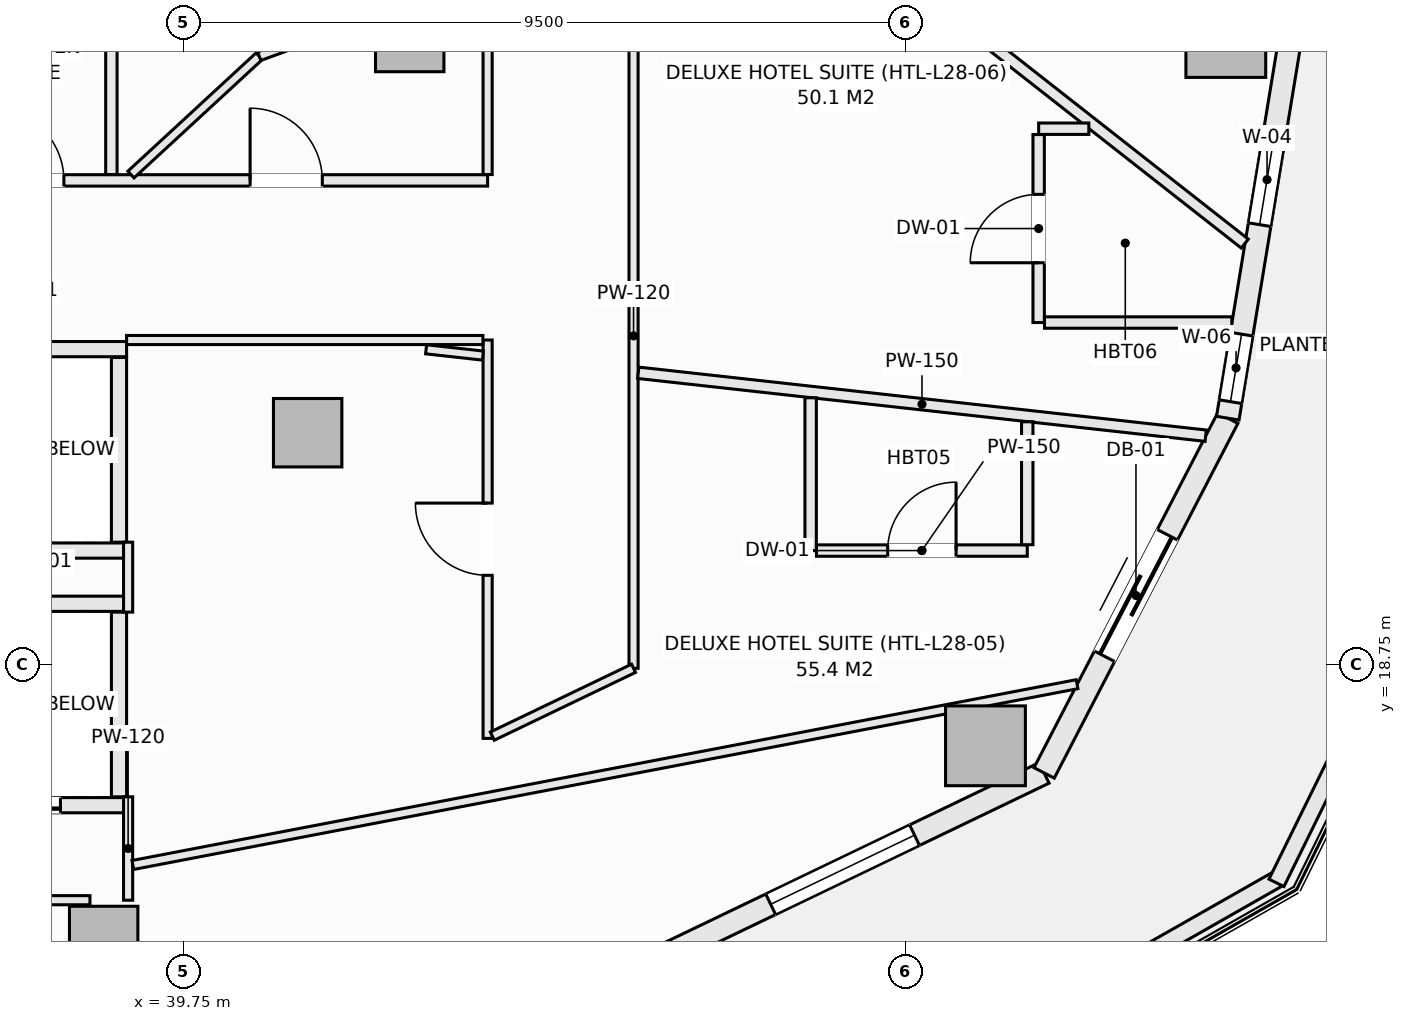
"""IFC4 building model, lengths in metres.
Left out: names, types, materials, properties, quantities, classifications, styles, units other than length and angle.
Written with IfcOpenShell. Run it as: python <this file> out.ifc"""

import sys

from ifc_helpers import new_model, si_unit, direction, frame, frame_2d, origin, origin_2d, place, context, subcontext, project, spatial, rectangle, extrude, element, fill, save


model = new_model("IFC4")
c1 = context("Model", 3, precision=1e-05, world=origin(), true_north=direction((0.0, 1.0)))
c2 = subcontext(c1, "Body", "Model", "MODEL_VIEW")
j1 = project(units=[si_unit("LENGTHUNIT", "METRE"), si_unit("PLANEANGLEUNIT", "RADIAN")], contexts=[c1])
p1 = place(None, origin())
s1 = spatial("IfcSite", under=j1, at=p1, CompositionType="ELEMENT")
p2 = place(p1, origin())
s2 = spatial("IfcBuilding", under=s1, at=p2, CompositionType="ELEMENT")
p3 = place(p2, frame((0.0, 0.0, 115.5)))
s3 = spatial("IfcBuildingStorey", under=s2, at=p3, CompositionType="ELEMENT", Elevation=115.5)
for number, where, z_axis, x_axis in (
    (1, (53.462, 27.0, -0.27), (0.0, 0.0, 1.0), (1.0, 0.0, 0.0)),
    (2, (50.3, 17.681, -0.27), (0.0, 0.0, 1.0), (1.0, 0.0, 0.0)),
):
    element("IfcColumn", number, at=place(p3, frame(where, z_axis=z_axis, x_axis=x_axis)), inside=s3, PredefinedType="COLUMN", context=c2, shape_type="SweptSolid", body=[
        extrude(rectangle(XDim=1.05, YDim=1.05, at=origin_2d()), origin(), (0.0, 0.0, 1.0), 3.4),
    ])
for number, where, z_axis, x_axis in (
    (3, (42.725, 27.0, -0.27), (0.0, 0.0, 1.0), (1.0, 0.0, 0.0)),
    (4, (38.698, 15.121, -0.27), (0.0, 0.0, 1.0), (1.0, 0.0, 0.0)),
    (5, (41.382, 21.801, -0.27), (0.0, 0.0, 1.0), (1.0, 0.0, 0.0)),
):
    element("IfcColumn", number, at=place(p3, frame(where, z_axis=z_axis, x_axis=x_axis)), inside=s3, PredefinedType="COLUMN", context=c2, shape_type="SweptSolid", body=[
        extrude(rectangle(XDim=0.9, YDim=0.9, at=origin_2d()), origin(), (0.0, 0.0, 1.0), 3.4),
    ])
p4 = place(p3, frame((45.769, 14.777, 0.0), z_axis=(0.0, 0.0, 1.0), x_axis=(0.901370184739, 0.433049408339, 0.0)))
e6 = element("IfcWall", 6, at=p4, inside=s3, PredefinedType="SOLIDWALL", context=c2, shape_type="SweptSolid", body=[
    extrude(rectangle(XDim=5.884, YDim=0.3, at=frame_2d((2.942, 0.0))), origin(), (0.0, 0.0, 1.0), 2.653),
])
p5 = place(p4, frame((1.892, 0.0, 0.74)))
e7 = element("IfcOpeningElement", 7, at=p5, cuts=e6, PredefinedType="OPENING", context=c2, shape_type="SweptSolid", body=[
    extrude(rectangle(XDim=2.1, YDim=1.7, at=frame_2d((1.05, 0.85))), frame((0.0, 0.16, 0.0), z_axis=(0.0, -1.0, 0.0), x_axis=(1.0, 0.0, 0.0)), (0.0, 0.0, 1.0), 0.32),
])
p6 = place(p3, frame((51.072, 17.325, 0.0), z_axis=(0.0, 0.0, 1.0), x_axis=(0.459767899643, 0.888039119892, 0.0)))
e8 = element("IfcWall", 8, at=p6, inside=s3, PredefinedType="SOLIDWALL", context=c2, shape_type="SweptSolid", body=[
    extrude(rectangle(XDim=5.255, YDim=0.3, at=frame_2d((2.628, 0.0))), origin(), (0.0, 0.0, 1.0), 2.653),
])
p7 = place(p6, frame((1.728, 0.0, 0.0)))
e9 = element("IfcOpeningElement", 9, at=p7, cuts=e8, PredefinedType="OPENING", context=c2, shape_type="SweptSolid", body=[
    extrude(rectangle(XDim=1.8, YDim=2.25, at=frame_2d((0.9, 1.125))), frame((0.0, 0.16, 0.0), z_axis=(0.0, -1.0, 0.0), x_axis=(1.0, 0.0, 0.0)), (0.0, 0.0, 1.0), 0.32),
])
p8 = place(p3, frame((53.488, 21.992, 0.0), z_axis=(0.0, 0.0, 1.0), x_axis=(0.162393944769, 0.986726003864, 0.0)))
e10 = element("IfcWall", 10, at=p8, inside=s3, PredefinedType="SOLIDWALL", context=c2, shape_type="SweptSolid", body=[
    extrude(rectangle(XDim=5.075, YDim=0.3, at=frame_2d((2.538, 0.0))), origin(), (0.0, 0.0, 1.0), 2.653),
])
p9 = place(p8, frame((2.58, 0.0, 0.72)))
e11 = element("IfcOpeningElement", 11, at=p9, cuts=e10, PredefinedType="OPENING", context=c2, shape_type="SweptSolid", body=[
    extrude(rectangle(XDim=1.2, YDim=1.65, at=frame_2d((0.6, 0.825))), frame((0.0, 0.16, 0.0), z_axis=(0.0, -1.0, 0.0), x_axis=(1.0, 0.0, 0.0)), (0.0, 0.0, 1.0), 0.32),
])
p10 = place(p8, frame((0.22, 0.0, 0.72)))
e12 = element("IfcOpeningElement", 12, at=p10, cuts=e10, PredefinedType="OPENING", context=c2, shape_type="SweptSolid", body=[
    extrude(rectangle(XDim=0.9, YDim=1.65, at=frame_2d((0.45, 0.825))), frame((0.0, 0.16, 0.0), z_axis=(0.0, -1.0, 0.0), x_axis=(1.0, 0.0, 0.0)), (0.0, 0.0, 1.0), 0.32),
])
p11 = place(p3, frame((48.413, 12.668, 0.0), z_axis=(0.0, 0.0, 1.0), x_axis=(0.869187658335, 0.494482370361, 0.0)))
e13 = element("IfcWall", 13, at=p11, inside=s3, PredefinedType="PARAPET", context=c2, shape_type="SweptSolid", body=[
    extrude(rectangle(XDim=6.606, YDim=0.22, at=frame_2d((3.303, 0.0))), origin(), (0.0, 0.0, 1.0), 0.52),
])
p12 = place(p3, frame((54.129, 15.878, 0.0), z_axis=(0.0, 0.0, 1.0), x_axis=(0.441269631716, 0.897374566235, 0.0)))
e14 = element("IfcWall", 14, at=p12, inside=s3, PredefinedType="PARAPET", context=c2, shape_type="SweptSolid", body=[
    extrude(rectangle(XDim=6.056, YDim=0.22, at=frame_2d((3.028, 0.0))), origin(), (0.0, 0.0, 1.0), 0.52),
])
p13 = place(p3, frame((36.75, 19.55, 0.0), z_axis=(0.0, 0.0, 1.0), x_axis=(1.0, 0.0, 0.0)))
e15 = element("IfcWall", 15, at=p13, inside=s3, PredefinedType="SOLIDWALL", context=c2, shape_type="SweptSolid", body=[
    extrude(rectangle(XDim=2.25, YDim=0.2, at=frame_2d((1.125, 0.0))), origin(), (0.0, 0.0, 1.0), 3.13),
])
p14 = place(p3, frame((36.75, 16.9, 0.0), z_axis=(0.0, 0.0, 1.0), x_axis=(1.0, 0.0, 0.0)))
e16 = element("IfcWall", 16, at=p14, inside=s3, PredefinedType="SOLIDWALL", context=c2, shape_type="SweptSolid", body=[
    extrude(rectangle(XDim=2.25, YDim=0.2, at=frame_2d((1.125, 0.0))), origin(), (0.0, 0.0, 1.0), 3.13),
])
p15 = place(p14, frame((0.28, 0.0, 0.0)))
e17 = element("IfcOpeningElement", 17, at=p15, cuts=e16, PredefinedType="OPENING", context=c2, shape_type="SweptSolid", body=[
    extrude(rectangle(XDim=1.1, YDim=2.2, at=frame_2d((0.55, 1.1))), frame((0.0, 0.11, 0.0), z_axis=(0.0, -1.0, 0.0), x_axis=(1.0, 0.0, 0.0)), (0.0, 0.0, 1.0), 0.22),
])
p16 = place(p3, frame((38.9, 17.01, 0.0), z_axis=(0.0, 0.0, 1.0), x_axis=(0.0, 1.0, 0.0)))
e18 = element("IfcWall", 18, at=p16, inside=s3, PredefinedType="SOLIDWALL", context=c2, shape_type="SweptSolid", body=[
    extrude(rectangle(XDim=2.43, YDim=0.2, at=frame_2d((1.215, 0.0))), origin(), (0.0, 0.0, 1.0), 3.13),
])
for number, where, z_axis, x_axis in (
    (19, (36.75, 22.9, 0.0), (0.0, 0.0, 1.0), (1.0, 0.0, 0.0)),
    (20, (36.75, 20.25, 0.0), (0.0, 0.0, 1.0), (1.0, 0.0, 0.0)),
):
    element("IfcWall", number, at=place(p3, frame(where, z_axis=z_axis, x_axis=x_axis)), inside=s3, PredefinedType="SOLIDWALL", context=c2, shape_type="SweptSolid", body=[
        extrude(rectangle(XDim=2.25, YDim=0.2, at=frame_2d((1.125, 0.0))), origin(), (0.0, 0.0, 1.0), 3.13),
    ])
p17 = place(p3, frame((38.9, 20.36, 0.0), z_axis=(0.0, 0.0, 1.0), x_axis=(0.0, 1.0, 0.0)))
e21 = element("IfcWall", 21, at=p17, inside=s3, PredefinedType="SOLIDWALL", context=c2, shape_type="SweptSolid", body=[
    extrude(rectangle(XDim=2.43, YDim=0.2, at=frame_2d((1.215, 0.0))), origin(), (0.0, 0.0, 1.0), 3.13),
])
p18 = place(p3, frame((29.78, 25.12, 0.0), z_axis=(0.0, 0.0, 1.0), x_axis=(1.0, 0.0, 0.0)))
e22 = element("IfcWall", 22, at=p18, inside=s3, PredefinedType="PARTITIONING", context=c2, shape_type="SweptSolid", body=[
    extrude(rectangle(XDim=13.97, YDim=0.15, at=frame_2d((6.985, 0.0))), origin(), (0.0, 0.0, 1.0), 3.13),
])
p19 = place(p18, frame((3.14, 0.0, 0.0)))
e23 = element("IfcOpeningElement", 23, at=p19, cuts=e22, PredefinedType="OPENING", context=c2, shape_type="SweptSolid", body=[
    extrude(rectangle(XDim=0.95, YDim=2.1, at=frame_2d((0.475, 1.05))), frame((0.0, 0.085, 0.0), z_axis=(0.0, -1.0, 0.0), x_axis=(1.0, 0.0, 0.0)), (0.0, 0.0, 1.0), 0.17),
])
p20 = place(p18, frame((7.445, 0.0, 0.0)))
e24 = element("IfcOpeningElement", 24, at=p20, cuts=e22, PredefinedType="OPENING", context=c2, shape_type="SweptSolid", body=[
    extrude(rectangle(XDim=0.95, YDim=2.1, at=frame_2d((0.475, 1.05))), frame((0.0, 0.085, 0.0), z_axis=(0.0, -1.0, 0.0), x_axis=(1.0, 0.0, 0.0)), (0.0, 0.0, 1.0), 0.17),
])
p21 = place(p18, frame((10.845, 0.0, 0.0)))
e25 = element("IfcOpeningElement", 25, at=p21, cuts=e22, PredefinedType="OPENING", context=c2, shape_type="SweptSolid", body=[
    extrude(rectangle(XDim=0.95, YDim=2.1, at=frame_2d((0.475, 1.05))), frame((0.0, 0.085, 0.0), z_axis=(0.0, -1.0, 0.0), x_axis=(1.0, 0.0, 0.0)), (0.0, 0.0, 1.0), 0.17),
])
p22 = place(p3, frame((38.8, 25.197, 0.0), z_axis=(0.0, 0.0, 1.0), x_axis=(0.0, 1.0, 0.0)))
e26 = element("IfcWall", 26, at=p22, inside=s3, PredefinedType="PARTITIONING", context=c2, shape_type="SweptSolid", body=[
    extrude(rectangle(XDim=3.646, YDim=0.15, at=frame_2d((1.823, 0.0))), origin(), (0.0, 0.0, 1.0), 3.13),
])
p23 = place(p3, frame((39.02, 15.65, 0.0), z_axis=(0.0, 0.0, 1.0), x_axis=(0.0, 1.0, 0.0)))
e27 = element("IfcWall", 27, at=p23, inside=s3, PredefinedType="PARTITIONING", context=c2, shape_type="SweptSolid", body=[
    extrude(rectangle(XDim=1.36, YDim=0.12, at=frame_2d((0.68, 0.0))), origin(), (0.0, 0.0, 1.0), 2.505),
])
p24 = place(p3, frame((39.02, 19.44, 0.0), z_axis=(0.0, 0.0, 1.0), x_axis=(0.0, 1.0, 0.0)))
e28 = element("IfcWall", 28, at=p24, inside=s3, PredefinedType="PARTITIONING", context=c2, shape_type="SweptSolid", body=[
    extrude(rectangle(XDim=0.92, YDim=0.12, at=frame_2d((0.46, 0.0))), origin(), (0.0, 0.0, 1.0), 3.13),
])
p25 = place(p3, frame((35.95, 15.65, 0.0), z_axis=(0.0, 0.0, 1.0), x_axis=(1.0, 0.0, 0.0)))
e29 = element("IfcWall", 29, at=p25, inside=s3, PredefinedType="PARTITIONING", context=c2, shape_type="SweptSolid", body=[
    extrude(rectangle(XDim=2.568, YDim=0.12, at=frame_2d((1.284, 0.0))), origin(), (0.0, 0.0, 1.0), 3.13),
])
p26 = place(p3, frame((43.75, 17.779, 0.0), z_axis=(0.0, 0.0, 1.0), x_axis=(0.0, 1.0, 0.0)))
e30 = element("IfcWall", 30, at=p26, inside=s3, PredefinedType="PARTITIONING", context=c2, shape_type="SweptSolid", body=[
    extrude(rectangle(XDim=5.241, YDim=0.12, at=frame_2d((2.621, 0.0))), origin(), (0.0, 0.0, 1.0), 3.13),
])
p27 = place(p26, frame((2.146, 0.0, 0.0)))
e31 = element("IfcOpeningElement", 31, at=p27, cuts=e30, PredefinedType="OPENING", context=c2, shape_type="SweptSolid", body=[
    extrude(rectangle(XDim=0.95, YDim=2.1, at=frame_2d((0.475, 1.05))), frame((0.0, 0.07, 0.0), z_axis=(0.0, -1.0, 0.0), x_axis=(1.0, 0.0, 0.0)), (0.0, 0.0, 1.0), 0.14),
])
p28 = place(p3, frame((43.75, 25.197, 0.0), z_axis=(0.0, 0.0, 1.0), x_axis=(0.0, 1.0, 0.0)))
e32 = element("IfcWall", 32, at=p28, inside=s3, PredefinedType="PARTITIONING", context=c2, shape_type="SweptSolid", body=[
    extrude(rectangle(XDim=2.313, YDim=0.12, at=frame_2d((1.156, 0.0))), origin(), (0.0, 0.0, 1.0), 3.13),
])
p29 = place(p3, frame((45.67, 18.701, 0.0), z_axis=(0.0, 0.0, 1.0), x_axis=(0.0, 1.0, 0.0)))
e33 = element("IfcWall", 33, at=p29, inside=s3, PredefinedType="PARTITIONING", context=c2, shape_type="SweptSolid", body=[
    extrude(rectangle(XDim=8.747, YDim=0.12, at=frame_2d((4.374, 0.0))), origin(), (0.0, 0.0, 1.0), 3.13),
])
p30 = place(p3, frame((43.812, 17.809, 0.0), z_axis=(0.0, 0.0, 1.0), x_axis=(0.901467594949, 0.432846595525, 0.0)))
e34 = element("IfcWall", 34, at=p30, inside=s3, PredefinedType="PARTITIONING", context=c2, shape_type="SweptSolid", body=[
    extrude(rectangle(XDim=2.061, YDim=0.12, at=frame_2d((1.031, 0.0))), origin(), (0.0, 0.0, 1.0), 3.13),
])
p31 = place(p3, frame((39.0, 23.02, 0.0), z_axis=(0.0, 0.0, 1.0), x_axis=(1.0, 0.0, 0.0)))
e35 = element("IfcWall", 35, at=p31, inside=s3, PredefinedType="PARTITIONING", context=c2, shape_type="SweptSolid", body=[
    extrude(rectangle(XDim=4.688, YDim=0.12, at=frame_2d((2.344, 0.0))), origin(), (0.0, 0.0, 1.0), 3.13),
])
p32 = place(p3, frame((42.941, 22.898, 0.0), z_axis=(0.0, 0.0, 1.0), x_axis=(0.993923268999, -0.110075134986, 0.0)))
e36 = element("IfcWall", 36, at=p32, inside=s3, PredefinedType="PARTITIONING", context=c2, shape_type="SweptSolid", body=[
    extrude(rectangle(XDim=0.752, YDim=0.12, at=frame_2d((0.376, 0.0))), origin(), (0.0, 0.0, 1.0), 3.13),
])
p33 = place(p3, frame((45.732, 22.589, 0.0), z_axis=(0.0, 0.0, 1.0), x_axis=(0.993915007742, -0.110149704422, 0.0)))
e37 = element("IfcWall", 37, at=p33, inside=s3, PredefinedType="PARTITIONING", context=c2, shape_type="SweptSolid", body=[
    extrude(rectangle(XDim=7.511, YDim=0.15, at=frame_2d((3.756, 0.0))), origin(), (0.0, 0.0, 1.0), 3.13),
])
p34 = place(p3, frame((39.082, 16.114, 0.0), z_axis=(0.0, 0.0, 1.0), x_axis=(0.982162094293, 0.188036221334, 0.0)))
e38 = element("IfcWall", 38, at=p34, inside=s3, PredefinedType="PARTITIONING", context=c2, shape_type="SweptSolid", body=[
    extrude(rectangle(XDim=12.649, YDim=0.12, at=frame_2d((6.324, 0.0))), origin(), (0.0, 0.0, 1.0), 2.702),
])
p35 = place(p3, frame((48.0, 20.25, 0.0), z_axis=(0.0, 0.0, 1.0), x_axis=(0.0, 1.0, 0.0)))
e39 = element("IfcWall", 39, at=p35, inside=s3, PredefinedType="PARTITIONING", context=c2, shape_type="SweptSolid", body=[
    extrude(rectangle(XDim=2.01, YDim=0.15, at=frame_2d((1.005, 0.0))), origin(), (0.0, 0.0, 1.0), 3.13),
])
p36 = place(p3, frame((48.077, 20.25, 0.0), z_axis=(0.0, 0.0, 1.0), x_axis=(1.0, 0.0, 0.0)))
e40 = element("IfcWall", 40, at=p36, inside=s3, PredefinedType="PARTITIONING", context=c2, shape_type="SweptSolid", body=[
    extrude(rectangle(XDim=2.773, YDim=0.15, at=frame_2d((1.387, 0.0))), origin(), (0.0, 0.0, 1.0), 3.13),
])
p37 = place(p36, frame((0.937, 0.0, 0.0)))
e41 = element("IfcOpeningElement", 41, at=p37, cuts=e40, PredefinedType="OPENING", context=c2, shape_type="SweptSolid", body=[
    extrude(rectangle(XDim=0.9, YDim=2.1, at=frame_2d((0.45, 1.05))), frame((0.0, 0.085, 0.0), z_axis=(0.0, -1.0, 0.0), x_axis=(1.0, 0.0, 0.0)), (0.0, 0.0, 1.0), 0.17),
])
p38 = place(p3, frame((50.85, 20.327, 0.0), z_axis=(0.0, 0.0, 1.0), x_axis=(0.0, 1.0, 0.0)))
e42 = element("IfcWall", 42, at=p38, inside=s3, PredefinedType="PARTITIONING", context=c2, shape_type="SweptSolid", body=[
    extrude(rectangle(XDim=1.617, YDim=0.15, at=frame_2d((0.809, 0.0))), origin(), (0.0, 0.0, 1.0), 3.13),
])
p39 = place(p3, frame((39.058, 25.197, 0.0), z_axis=(0.0, 0.0, 1.0), x_axis=(0.73497871786, 0.67809017416, 0.0)))
e43 = element("IfcWall", 43, at=p39, inside=s3, PredefinedType="PARTITIONING", context=c2, shape_type="SweptSolid", body=[
    extrude(rectangle(XDim=2.296, YDim=0.12, at=frame_2d((1.148, 0.0))), origin(), (0.0, 0.0, 1.0), 3.13),
])
p40 = place(p3, frame((40.745, 26.754, 0.0), z_axis=(0.0, 0.0, 1.0), x_axis=(0.939656245212, 0.342120067862, 0.0)))
e44 = element("IfcWall", 44, at=p40, inside=s3, PredefinedType="PARTITIONING", context=c2, shape_type="SweptSolid", body=[
    extrude(rectangle(XDim=2.912, YDim=0.12, at=frame_2d((1.456, 0.0))), origin(), (0.0, 0.0, 1.0), 3.13),
])
p41 = place(p3, frame((45.258, 30.919, 0.0), z_axis=(0.0, 0.0, 1.0), x_axis=(0.786869212034, -0.617119796436, 0.0)))
e45 = element("IfcWall", 45, at=p41, inside=s3, PredefinedType="PARTITIONING", context=c2, shape_type="SweptSolid", body=[
    extrude(rectangle(XDim=10.744, YDim=0.15, at=frame_2d((5.372, 0.0))), origin(), (0.0, 0.0, 1.0), 2.505),
])
p42 = place(p3, frame((51.0, 25.8, 0.0), z_axis=(0.0, 0.0, 1.0), x_axis=(1.0, 0.0, 0.0)))
e46 = element("IfcWall", 46, at=p42, inside=s3, PredefinedType="PARTITIONING", context=c2, shape_type="SweptSolid", body=[
    extrude(rectangle(XDim=0.66, YDim=0.15, at=frame_2d((0.33, 0.0))), origin(), (0.0, 0.0, 1.0), 3.13),
])
p43 = place(p3, frame((51.0, 23.25, 0.0), z_axis=(0.0, 0.0, 1.0), x_axis=(0.0, 1.0, 0.0)))
e47 = element("IfcWall", 47, at=p43, inside=s3, PredefinedType="PARTITIONING", context=c2, shape_type="SweptSolid", body=[
    extrude(rectangle(XDim=2.473, YDim=0.15, at=frame_2d((1.236, 0.0))), origin(), (0.0, 0.0, 1.0), 3.13),
])
p44 = place(p43, frame((0.787, 0.0, 0.0)))
e48 = element("IfcOpeningElement", 48, at=p44, cuts=e47, PredefinedType="OPENING", context=c2, shape_type="SweptSolid", body=[
    extrude(rectangle(XDim=0.9, YDim=2.1, at=frame_2d((0.45, 1.05))), frame((0.0, 0.085, 0.0), z_axis=(0.0, -1.0, 0.0), x_axis=(1.0, 0.0, 0.0)), (0.0, 0.0, 1.0), 0.17),
])
p45 = place(p3, frame((51.077, 23.25, 0.0), z_axis=(0.0, 0.0, 1.0), x_axis=(1.0, 0.0, 0.0)))
e49 = element("IfcWall", 49, at=p45, inside=s3, PredefinedType="PARTITIONING", context=c2, shape_type="SweptSolid", body=[
    extrude(rectangle(XDim=2.464, YDim=0.15, at=frame_2d((1.232, 0.0))), origin(), (0.0, 0.0, 1.0), 3.13),
])
p46 = place(p5, origin())
e50 = element("IfcWindow", 50, at=p46, inside=s3, PartitioningType="SINGLE_PANEL", PredefinedType="WINDOW", context=c2, shape_type="SweptSolid", body=[
    extrude(rectangle(XDim=2.1, YDim=1.7, at=frame_2d((1.05, 0.85))), frame((0.0, 0.03, 0.0), z_axis=(0.0, -1.0, 0.0), x_axis=(1.0, 0.0, 0.0)), (0.0, 0.0, 1.0), 0.06),
])
fill(e7, e50)
p47 = place(p7, frame((1.8, 0.0, 0.0), z_axis=(0.0, 0.0, 1.0), x_axis=(-1.0, 0.0, 0.0)))
e51 = element("IfcDoor", 51, at=p47, inside=s3, OperationType="SLIDING_TO_LEFT", PredefinedType="DOOR", context=c2, shape_type="SweptSolid", body=[
    extrude(rectangle(XDim=1.8, YDim=2.25, at=frame_2d((0.9, 1.125))), frame((0.0, 0.025, 0.0), z_axis=(0.0, -1.0, 0.0), x_axis=(1.0, 0.0, 0.0)), (0.0, 0.0, 1.0), 0.05),
])
fill(e9, e51)
p48 = place(p9, origin())
e52 = element("IfcWindow", 52, at=p48, inside=s3, PartitioningType="SINGLE_PANEL", PredefinedType="WINDOW", context=c2, shape_type="SweptSolid", body=[
    extrude(rectangle(XDim=1.2, YDim=1.65, at=frame_2d((0.6, 0.825))), frame((0.0, 0.03, 0.0), z_axis=(0.0, -1.0, 0.0), x_axis=(1.0, 0.0, 0.0)), (0.0, 0.0, 1.0), 0.06),
])
fill(e11, e52)
p49 = place(p15, origin())
e53 = element("IfcDoor", 53, at=p49, inside=s3, OperationType="SLIDING_TO_LEFT", PredefinedType="DOOR", context=c2, shape_type="SweptSolid", body=[
    extrude(rectangle(XDim=1.1, YDim=2.2, at=frame_2d((0.55, 1.1))), frame((0.0, 0.025, 0.0), z_axis=(0.0, -1.0, 0.0), x_axis=(1.0, 0.0, 0.0)), (0.0, 0.0, 1.0), 0.05),
])
fill(e17, e53)
p50 = place(p20, origin())
e54 = element("IfcDoor", 54, at=p50, inside=s3, OperationType="SINGLE_SWING_LEFT", PredefinedType="DOOR", context=c2, shape_type="SweptSolid", body=[
    extrude(rectangle(XDim=0.95, YDim=2.1, at=frame_2d((0.475, 1.05))), frame((0.0, 0.025, 0.0), z_axis=(0.0, -1.0, 0.0), x_axis=(1.0, 0.0, 0.0)), (0.0, 0.0, 1.0), 0.05),
])
fill(e24, e54)
p51 = place(p27, origin())
e55 = element("IfcDoor", 55, at=p51, inside=s3, OperationType="SINGLE_SWING_RIGHT", PredefinedType="DOOR", context=c2, shape_type="SweptSolid", body=[
    extrude(rectangle(XDim=0.95, YDim=2.1, at=frame_2d((0.475, 1.05))), frame((0.0, 0.025, 0.0), z_axis=(0.0, -1.0, 0.0), x_axis=(1.0, 0.0, 0.0)), (0.0, 0.0, 1.0), 0.05),
])
fill(e31, e55)
p52 = place(p21, origin())
e56 = element("IfcDoor", 56, at=p52, inside=s3, OperationType="SINGLE_SWING_LEFT", PredefinedType="DOOR", context=c2, shape_type="SweptSolid", body=[
    extrude(rectangle(XDim=0.95, YDim=2.1, at=frame_2d((0.475, 1.05))), frame((0.0, 0.025, 0.0), z_axis=(0.0, -1.0, 0.0), x_axis=(1.0, 0.0, 0.0)), (0.0, 0.0, 1.0), 0.05),
])
fill(e25, e56)
p53 = place(p37, origin())
e57 = element("IfcDoor", 57, at=p53, inside=s3, OperationType="SINGLE_SWING_RIGHT", PredefinedType="DOOR", context=c2, shape_type="SweptSolid", body=[
    extrude(rectangle(XDim=0.9, YDim=2.1, at=frame_2d((0.45, 1.05))), frame((0.0, 0.025, 0.0), z_axis=(0.0, -1.0, 0.0), x_axis=(1.0, 0.0, 0.0)), (0.0, 0.0, 1.0), 0.05),
])
fill(e41, e57)
p54 = place(p44, origin())
e58 = element("IfcDoor", 58, at=p54, inside=s3, OperationType="SINGLE_SWING_LEFT", PredefinedType="DOOR", context=c2, shape_type="SweptSolid", body=[
    extrude(rectangle(XDim=0.9, YDim=2.1, at=frame_2d((0.45, 1.05))), frame((0.0, 0.025, 0.0), z_axis=(0.0, -1.0, 0.0), x_axis=(1.0, 0.0, 0.0)), (0.0, 0.0, 1.0), 0.05),
])
fill(e48, e58)
p55 = place(p10, origin())
e59 = element("IfcWindow", 59, at=p55, inside=s3, PartitioningType="SINGLE_PANEL", PredefinedType="WINDOW", context=c2, shape_type="SweptSolid", body=[
    extrude(rectangle(XDim=0.9, YDim=1.65, at=frame_2d((0.45, 0.825))), frame((0.0, 0.03, 0.0), z_axis=(0.0, -1.0, 0.0), x_axis=(1.0, 0.0, 0.0)), (0.0, 0.0, 1.0), 0.06),
])
fill(e12, e59)
save(model, sys.argv[1])
